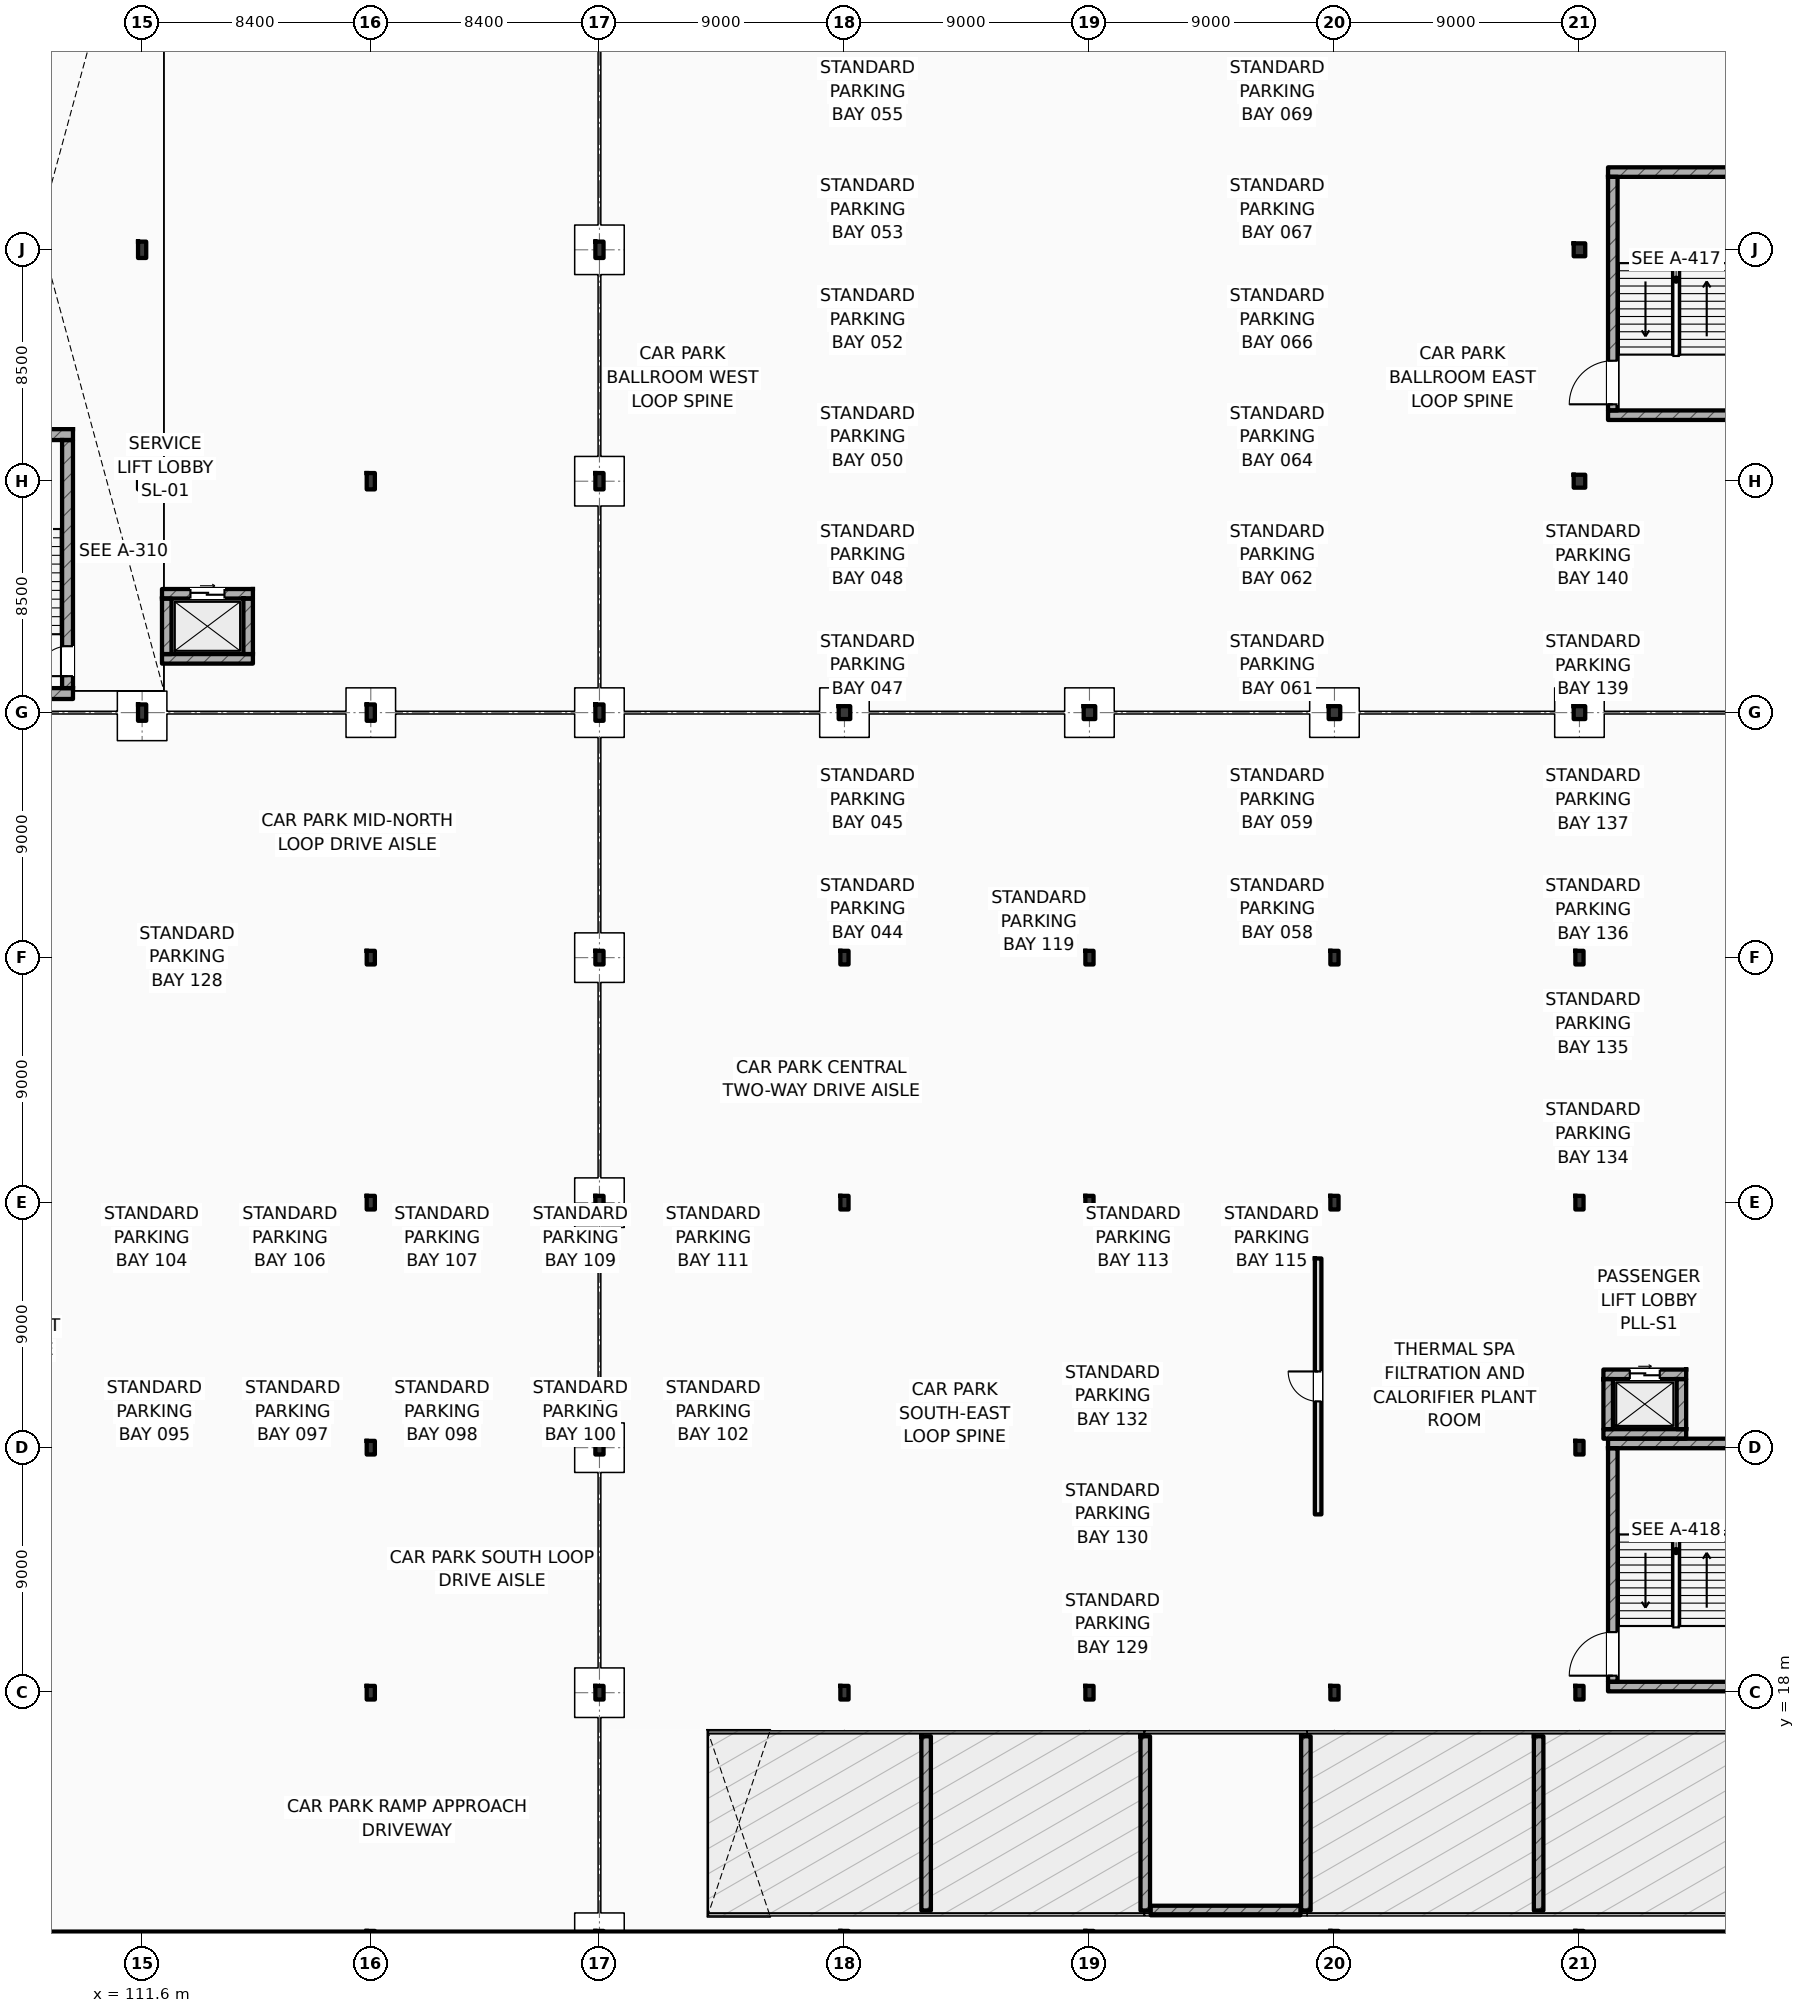
"""IFC4 building model, lengths in metres.
Left out: names, types, materials, properties, quantities, classifications, styles, units other than length and angle.
Written with IfcOpenShell. Run it as: python <this file> out.ifc"""

import sys

from ifc_helpers import new_model, si_unit, direction, frame, frame_2d, origin, origin_2d, place, context, subcontext, project, spatial, rectangle, i_section, extrude, element, fill, save


model = new_model("IFC4")
c1 = context("Model", 3, precision=1e-05, world=origin(), true_north=direction((0.0, 1.0)))
c2 = subcontext(c1, "Body", "Model", "MODEL_VIEW")
j1 = project(units=[si_unit("LENGTHUNIT", "METRE"), si_unit("PLANEANGLEUNIT", "RADIAN")], contexts=[c1])
p1 = place(None, origin())
s1 = spatial("IfcSite", under=j1, at=p1, CompositionType="ELEMENT")
p2 = place(p1, origin())
s2 = spatial("IfcBuilding", under=s1, at=p2, CompositionType="ELEMENT")
p3 = place(p2, frame((0.0, 0.0, -4.5)))
s3 = spatial("IfcBuildingStorey", under=s2, at=p3, CompositionType="ELEMENT", Elevation=-4.5)
p4 = place(p3, frame((103.2, 9.0, 0.0), z_axis=(0.0, 0.0, 1.0), x_axis=(1.0, 0.0, 0.0)))
e1 = element("IfcWall", 1, at=p4, inside=s3, PredefinedType="SOLIDWALL", context=c2, shape_type="SweptSolid", body=[
    extrude(rectangle(XDim=68.8, YDim=0.45, at=frame_2d((34.4, 0.0))), origin(), (0.0, 0.0, 1.0), 4.5),
])
for number, where, z_axis, x_axis in (
    (2, (111.6, 54.0, 0.0), (0.0, 0.0, 1.0), (1.0, 0.0, 0.0)),
    (3, (111.6, 62.5, 0.0), (0.0, 0.0, 1.0), (1.0, 0.0, 0.0)),
    (4, (111.6, 71.0, 0.0), (0.0, 0.0, 1.0), (1.0, 0.0, 0.0)),
    (5, (120.0, 54.0, 0.0), (0.0, 0.0, 1.0), (1.0, 0.0, 0.0)),
    (6, (120.0, 62.5, 0.0), (0.0, 0.0, 1.0), (1.0, 0.0, 0.0)),
    (7, (128.4, 54.0, 0.0), (0.0, 0.0, 1.0), (1.0, 0.0, 0.0)),
    (8, (128.4, 62.5, 0.0), (0.0, 0.0, 1.0), (1.0, 0.0, 0.0)),
    (9, (128.4, 71.0, 0.0), (0.0, 0.0, 1.0), (1.0, 0.0, 0.0)),
):
    element("IfcColumn", number, at=place(p3, frame(where, z_axis=z_axis, x_axis=x_axis)), inside=s3, PredefinedType="COLUMN", context=c2, shape_type="SweptSolid", body=[
        extrude(i_section(OverallWidth=0.3, OverallDepth=0.6, WebThickness=0.015, FlangeThickness=0.03, FilletRadius=0.027, at=origin_2d()), origin(), (0.0, 0.0, 1.0), 4.5),
    ])
for number, where, z_axis, x_axis in (
    (10, (164.4, 54.0, 0.0), (0.0, 0.0, 1.0), (1.0, 0.0, 0.0)),
    (11, (164.4, 62.5, 0.0), (0.0, 0.0, 1.0), (1.0, 0.0, 0.0)),
    (12, (164.4, 71.0, 0.0), (0.0, 0.0, 1.0), (1.0, 0.0, 0.0)),
    (13, (137.4, 54.0, 0.0), (0.0, 0.0, 1.0), (1.0, 0.0, 0.0)),
    (14, (146.4, 54.0, 0.0), (0.0, 0.0, 1.0), (1.0, 0.0, 0.0)),
    (15, (155.4, 54.0, 0.0), (0.0, 0.0, 1.0), (1.0, 0.0, 0.0)),
):
    element("IfcColumn", number, at=place(p3, frame(where, z_axis=z_axis, x_axis=x_axis)), inside=s3, PredefinedType="COLUMN", context=c2, shape_type="SweptSolid", body=[
        extrude(i_section(OverallWidth=0.424, OverallDepth=0.474, WebThickness=0.045, FlangeThickness=0.055, FilletRadius=0.015, at=origin_2d()), origin(), (0.0, 0.0, 1.0), 4.5),
    ])
for number, where, z_axis, x_axis in (
    (16, (120.0, 9.0, 0.0), (0.0, 0.0, 1.0), (1.0, 0.0, 0.0)),
    (17, (120.0, 18.0, 0.0), (0.0, 0.0, 1.0), (1.0, 0.0, 0.0)),
    (18, (120.0, 27.0, 0.0), (0.0, 0.0, 1.0), (1.0, 0.0, 0.0)),
    (19, (120.0, 36.0, 0.0), (0.0, 0.0, 1.0), (1.0, 0.0, 0.0)),
    (20, (120.0, 45.0, 0.0), (0.0, 0.0, 1.0), (1.0, 0.0, 0.0)),
    (21, (128.4, 9.0, 0.0), (0.0, 0.0, 1.0), (1.0, 0.0, 0.0)),
    (22, (128.4, 18.0, 0.0), (0.0, 0.0, 1.0), (1.0, 0.0, 0.0)),
    (23, (128.4, 27.0, 0.0), (0.0, 0.0, 1.0), (1.0, 0.0, 0.0)),
    (24, (128.4, 36.0, 0.0), (0.0, 0.0, 1.0), (1.0, 0.0, 0.0)),
    (25, (128.4, 45.0, 0.0), (0.0, 0.0, 1.0), (1.0, 0.0, 0.0)),
    (26, (137.4, 9.0, 0.0), (0.0, 0.0, 1.0), (1.0, 0.0, 0.0)),
    (27, (137.4, 18.0, 0.0), (0.0, 0.0, 1.0), (1.0, 0.0, 0.0)),
    (28, (137.4, 36.0, 0.0), (0.0, 0.0, 1.0), (1.0, 0.0, 0.0)),
    (29, (137.4, 45.0, 0.0), (0.0, 0.0, 1.0), (1.0, 0.0, 0.0)),
    (30, (146.4, 9.0, 0.0), (0.0, 0.0, 1.0), (1.0, 0.0, 0.0)),
    (31, (146.4, 18.0, 0.0), (0.0, 0.0, 1.0), (1.0, 0.0, 0.0)),
    (32, (146.4, 36.0, 0.0), (0.0, 0.0, 1.0), (1.0, 0.0, 0.0)),
    (33, (146.4, 45.0, 0.0), (0.0, 0.0, 1.0), (1.0, 0.0, 0.0)),
    (34, (155.4, 9.0, 0.0), (0.0, 0.0, 1.0), (1.0, 0.0, 0.0)),
    (35, (155.4, 18.0, 0.0), (0.0, 0.0, 1.0), (1.0, 0.0, 0.0)),
    (36, (155.4, 36.0, 0.0), (0.0, 0.0, 1.0), (1.0, 0.0, 0.0)),
    (37, (155.4, 45.0, 0.0), (0.0, 0.0, 1.0), (1.0, 0.0, 0.0)),
    (38, (164.4, 9.0, 0.0), (0.0, 0.0, 1.0), (1.0, 0.0, 0.0)),
    (39, (164.4, 18.0, 0.0), (0.0, 0.0, 1.0), (1.0, 0.0, 0.0)),
    (40, (164.4, 27.0, 0.0), (0.0, 0.0, 1.0), (1.0, 0.0, 0.0)),
    (41, (164.4, 36.0, 0.0), (0.0, 0.0, 1.0), (1.0, 0.0, 0.0)),
    (42, (164.4, 45.0, 0.0), (0.0, 0.0, 1.0), (1.0, 0.0, 0.0)),
):
    element("IfcColumn", number, at=place(p3, frame(where, z_axis=z_axis, x_axis=x_axis)), inside=s3, PredefinedType="COLUMN", context=c2, shape_type="SweptSolid", body=[
        extrude(i_section(OverallWidth=0.3, OverallDepth=0.5, WebThickness=0.014, FlangeThickness=0.028, FilletRadius=0.027, at=origin_2d()), origin(), (0.0, 0.0, 1.0), 4.5),
    ])
for number, where, z_axis, x_axis in (
    (43, (104.1, 64.212, 0.0), (0.0, 0.0, 1.0), (1.0, 0.0, 0.0)),
    (44, (104.1, 54.7, 0.0), (0.0, 0.0, 1.0), (1.0, 0.0, 0.0)),
):
    element("IfcWall", number, at=place(p3, frame(where, z_axis=z_axis, x_axis=x_axis)), inside=s3, PredefinedType="SHEAR", context=c2, shape_type="SweptSolid", body=[
        extrude(rectangle(XDim=4.96, YDim=0.4, at=frame_2d((2.48, 0.0))), origin(), (0.0, 0.0, 1.0), 4.5),
    ])
p5 = place(p3, frame((108.86, 54.9, 0.0), z_axis=(0.0, 0.0, 1.0), x_axis=(0.0, 1.0, 0.0)))
e45 = element("IfcWall", 45, at=p5, inside=s3, PredefinedType="SHEAR", context=c2, shape_type="SweptSolid", body=[
    extrude(rectangle(XDim=9.112, YDim=0.4, at=frame_2d((4.556, 0.0))), origin(), (0.0, 0.0, 1.0), 4.5),
])
p6 = place(p5, frame((0.44, 0.0, 0.0)))
e46 = element("IfcOpeningElement", 46, at=p6, cuts=e45, PredefinedType="OPENING", context=c2, shape_type="SweptSolid", body=[
    extrude(rectangle(XDim=1.1, YDim=2.2, at=frame_2d((0.55, 1.1))), frame((0.0, 0.21, 0.0), z_axis=(0.0, -1.0, 0.0), x_axis=(1.0, 0.0, 0.0)), (0.0, 0.0, 1.0), 0.42),
])
for number, where, z_axis, x_axis in (
    (47, (165.45, 73.855, 0.0), (0.0, 0.0, 1.0), (1.0, 0.0, 0.0)),
    (48, (165.45, 64.925, 0.0), (0.0, 0.0, 1.0), (1.0, 0.0, 0.0)),
):
    element("IfcWall", number, at=place(p3, frame(where, z_axis=z_axis, x_axis=x_axis)), inside=s3, PredefinedType="SHEAR", context=c2, shape_type="SweptSolid", body=[
        extrude(rectangle(XDim=5.0, YDim=0.35, at=frame_2d((2.5, 0.0))), origin(), (0.0, 0.0, 1.0), 4.5),
    ])
p7 = place(p3, frame((165.625, 65.1, 0.0), z_axis=(0.0, 0.0, 1.0), x_axis=(0.0, 1.0, 0.0)))
e49 = element("IfcWall", 49, at=p7, inside=s3, PredefinedType="SHEAR", context=c2, shape_type="SweptSolid", body=[
    extrude(rectangle(XDim=8.58, YDim=0.35, at=frame_2d((4.29, 0.0))), origin(), (0.0, 0.0, 1.0), 4.5),
])
p8 = place(p7, frame((0.225, 0.0, 0.0)))
e50 = element("IfcOpeningElement", 50, at=p8, cuts=e49, PredefinedType="OPENING", context=c2, shape_type="SweptSolid", body=[
    extrude(rectangle(XDim=1.6, YDim=2.2, at=frame_2d((0.8, 1.1))), frame((0.0, 0.185, 0.0), z_axis=(0.0, -1.0, 0.0), x_axis=(1.0, 0.0, 0.0)), (0.0, 0.0, 1.0), 0.37),
])
for number, where, z_axis, x_axis in (
    (51, (165.45, 27.155, 0.0), (0.0, 0.0, 1.0), (1.0, 0.0, 0.0)),
    (52, (165.45, 18.225, 0.0), (0.0, 0.0, 1.0), (1.0, 0.0, 0.0)),
):
    element("IfcWall", number, at=place(p3, frame(where, z_axis=z_axis, x_axis=x_axis)), inside=s3, PredefinedType="SHEAR", context=c2, shape_type="SweptSolid", body=[
        extrude(rectangle(XDim=5.0, YDim=0.35, at=frame_2d((2.5, 0.0))), origin(), (0.0, 0.0, 1.0), 4.5),
    ])
p9 = place(p3, frame((165.625, 18.4, 0.0), z_axis=(0.0, 0.0, 1.0), x_axis=(0.0, 1.0, 0.0)))
e53 = element("IfcWall", 53, at=p9, inside=s3, PredefinedType="SHEAR", context=c2, shape_type="SweptSolid", body=[
    extrude(rectangle(XDim=8.58, YDim=0.35, at=frame_2d((4.29, 0.0))), origin(), (0.0, 0.0, 1.0), 4.5),
])
p10 = place(p9, frame((0.225, 0.0, 0.0)))
e54 = element("IfcOpeningElement", 54, at=p10, cuts=e53, PredefinedType="OPENING", context=c2, shape_type="SweptSolid", body=[
    extrude(rectangle(XDim=1.6, YDim=2.2, at=frame_2d((0.8, 1.1))), frame((0.0, 0.185, 0.0), z_axis=(0.0, -1.0, 0.0), x_axis=(1.0, 0.0, 0.0)), (0.0, 0.0, 1.0), 0.37),
])
p11 = place(p3, frame((140.4, 10.0, 0.0), z_axis=(0.0, 0.0, 1.0), x_axis=(0.0, 1.0, 0.0)))
e55 = element("IfcWall", 55, at=p11, inside=s3, PredefinedType="SHEAR", context=c2, shape_type="SweptSolid", body=[
    extrude(rectangle(XDim=6.4, YDim=0.35, at=frame_2d((3.2, 0.0))), origin(), (0.0, 0.0, 1.0), 0.8),
])
for number, where, z_axis, x_axis in (
    (56, (148.45, 10.0, 0.0), (0.0, 0.0, 1.0), (0.0, 1.0, 0.0)),
    (57, (154.35, 10.0, 0.0), (0.0, 0.0, 1.0), (0.0, 1.0, 0.0)),
):
    element("IfcWall", number, at=place(p3, frame(where, z_axis=z_axis, x_axis=x_axis)), inside=s3, PredefinedType="SHEAR", context=c2, shape_type="SweptSolid", body=[
        extrude(rectangle(XDim=6.4, YDim=0.35, at=frame_2d((3.2, 0.0))), origin(), (0.0, 0.0, 1.0), 1.95),
    ])
p12 = place(p3, frame((148.65, 10.0, 0.0), z_axis=(0.0, 0.0, 1.0), x_axis=(1.0, 0.0, 0.0)))
e58 = element("IfcWall", 58, at=p12, inside=s3, PredefinedType="SHEAR", context=c2, shape_type="SweptSolid", body=[
    extrude(rectangle(XDim=5.5, YDim=0.35, at=frame_2d((2.75, 0.0))), origin(), (0.0, 0.0, 1.0), 1.95),
])
p13 = place(p3, frame((162.9, 10.0, 0.0), z_axis=(0.0, 0.0, 1.0), x_axis=(0.0, 1.0, 0.0)))
e59 = element("IfcWall", 59, at=p13, inside=s3, PredefinedType="SHEAR", context=c2, shape_type="SweptSolid", body=[
    extrude(rectangle(XDim=6.4, YDim=0.35, at=frame_2d((3.2, 0.0))), origin(), (0.0, 0.0, 1.0), 3.05),
])
p14 = place(p3, frame((165.28, 29.695, 0.0), z_axis=(0.0, 0.0, 1.0), x_axis=(1.0, 0.0, 0.0)))
e60 = element("IfcWall", 60, at=p14, inside=s3, PredefinedType="SHEAR", context=c2, shape_type="SweptSolid", body=[
    extrude(rectangle(XDim=3.04, YDim=0.35, at=frame_2d((1.52, 0.0))), origin(), (0.0, 0.0, 1.0), 4.1),
])
p15 = place(p14, frame((0.97, 0.0, 0.0)))
e61 = element("IfcOpeningElement", 61, at=p15, cuts=e60, PredefinedType="OPENING", context=c2, shape_type="SweptSolid", body=[
    extrude(rectangle(XDim=1.1, YDim=2.2, at=frame_2d((0.55, 1.1))), frame((0.0, 0.185, 0.0), z_axis=(0.0, -1.0, 0.0), x_axis=(1.0, 0.0, 0.0)), (0.0, 0.0, 1.0), 0.37),
])
p16 = place(p3, frame((165.28, 27.505, 0.0), z_axis=(0.0, 0.0, 1.0), x_axis=(1.0, 0.0, 0.0)))
e62 = element("IfcWall", 62, at=p16, inside=s3, PredefinedType="SHEAR", context=c2, shape_type="SweptSolid", body=[
    extrude(rectangle(XDim=3.04, YDim=0.35, at=frame_2d((1.52, 0.0))), origin(), (0.0, 0.0, 1.0), 4.1),
])
for number, where, z_axis, x_axis in (
    (63, (165.455, 27.68, 0.0), (0.0, 0.0, 1.0), (0.0, 1.0, 0.0)),
    (64, (168.145, 27.68, 0.0), (0.0, 0.0, 1.0), (0.0, 1.0, 0.0)),
):
    element("IfcWall", number, at=place(p3, frame(where, z_axis=z_axis, x_axis=x_axis)), inside=s3, PredefinedType="SHEAR", context=c2, shape_type="SweptSolid", body=[
        extrude(rectangle(XDim=1.84, YDim=0.35, at=frame_2d((0.92, 0.0))), origin(), (0.0, 0.0, 1.0), 4.1),
    ])
p17 = place(p3, frame((112.33, 58.365, 0.0), z_axis=(0.0, 0.0, 1.0), x_axis=(1.0, 0.0, 0.0)))
e65 = element("IfcWall", 65, at=p17, inside=s3, PredefinedType="SHEAR", context=c2, shape_type="SweptSolid", body=[
    extrude(rectangle(XDim=3.34, YDim=0.35, at=frame_2d((1.67, 0.0))), origin(), (0.0, 0.0, 1.0), 4.1),
])
p18 = place(p17, frame((1.045, 0.0, 0.0)))
e66 = element("IfcOpeningElement", 66, at=p18, cuts=e65, PredefinedType="OPENING", context=c2, shape_type="SweptSolid", body=[
    extrude(rectangle(XDim=1.25, YDim=2.25, at=frame_2d((0.625, 1.125))), frame((0.0, 0.185, 0.0), z_axis=(0.0, -1.0, 0.0), x_axis=(1.0, 0.0, 0.0)), (0.0, 0.0, 1.0), 0.37),
])
p19 = place(p3, frame((112.33, 55.975, 0.0), z_axis=(0.0, 0.0, 1.0), x_axis=(1.0, 0.0, 0.0)))
e67 = element("IfcWall", 67, at=p19, inside=s3, PredefinedType="SHEAR", context=c2, shape_type="SweptSolid", body=[
    extrude(rectangle(XDim=3.34, YDim=0.35, at=frame_2d((1.67, 0.0))), origin(), (0.0, 0.0, 1.0), 4.1),
])
for number, where, z_axis, x_axis in (
    (68, (112.505, 56.15, 0.0), (0.0, 0.0, 1.0), (0.0, 1.0, 0.0)),
    (69, (115.495, 56.15, 0.0), (0.0, 0.0, 1.0), (0.0, 1.0, 0.0)),
):
    element("IfcWall", number, at=place(p3, frame(where, z_axis=z_axis, x_axis=x_axis)), inside=s3, PredefinedType="SHEAR", context=c2, shape_type="SweptSolid", body=[
        extrude(rectangle(XDim=2.04, YDim=0.35, at=frame_2d((1.02, 0.0))), origin(), (0.0, 0.0, 1.0), 4.1),
    ])
p20 = place(p3, frame((154.8, 24.55, 0.0), z_axis=(0.0, 0.0, 1.0), x_axis=(0.0, 1.0, 0.0)))
e70 = element("IfcWall", 70, at=p20, inside=s3, PredefinedType="STANDARD", context=c2, shape_type="SweptSolid", body=[
    extrude(rectangle(XDim=9.4, YDim=0.24, at=frame_2d((4.7, 0.0))), origin(), (0.0, 0.0, 1.0), 4.1),
])
p21 = place(p20, frame((4.15, 0.0, 0.0)))
e71 = element("IfcOpeningElement", 71, at=p21, cuts=e70, PredefinedType="OPENING", context=c2, shape_type="SweptSolid", body=[
    extrude(rectangle(XDim=1.1, YDim=2.2, at=frame_2d((0.55, 1.1))), frame((0.0, 0.13, 0.0), z_axis=(0.0, -1.0, 0.0), x_axis=(1.0, 0.0, 0.0)), (0.0, 0.0, 1.0), 0.26),
])
p22 = place(p6, origin())
e72 = element("IfcDoor", 72, at=p22, inside=s3, OperationType="SINGLE_SWING_LEFT", PredefinedType="DOOR", context=c2, shape_type="SweptSolid", body=[
    extrude(rectangle(XDim=1.1, YDim=2.2, at=frame_2d((0.55, 1.1))), frame((0.0, 0.025, 0.0), z_axis=(0.0, -1.0, 0.0), x_axis=(1.0, 0.0, 0.0)), (0.0, 0.0, 1.0), 0.05),
])
fill(e46, e72)
p23 = place(p8, origin())
e73 = element("IfcDoor", 73, at=p23, inside=s3, OperationType="SINGLE_SWING_LEFT", PredefinedType="DOOR", context=c2, shape_type="SweptSolid", body=[
    extrude(rectangle(XDim=1.6, YDim=2.2, at=frame_2d((0.8, 1.1))), frame((0.0, 0.025, 0.0), z_axis=(0.0, -1.0, 0.0), x_axis=(1.0, 0.0, 0.0)), (0.0, 0.0, 1.0), 0.05),
])
fill(e50, e73)
p24 = place(p10, origin())
e74 = element("IfcDoor", 74, at=p24, inside=s3, OperationType="SINGLE_SWING_LEFT", PredefinedType="DOOR", context=c2, shape_type="SweptSolid", body=[
    extrude(rectangle(XDim=1.6, YDim=2.2, at=frame_2d((0.8, 1.1))), frame((0.0, 0.025, 0.0), z_axis=(0.0, -1.0, 0.0), x_axis=(1.0, 0.0, 0.0)), (0.0, 0.0, 1.0), 0.05),
])
fill(e54, e74)
p25 = place(p15, origin())
e75 = element("IfcDoor", 75, at=p25, inside=s3, OperationType="SLIDING_TO_LEFT", PredefinedType="DOOR", context=c2, shape_type="SweptSolid", body=[
    extrude(rectangle(XDim=1.1, YDim=2.2, at=frame_2d((0.55, 1.1))), frame((0.0, 0.025, 0.0), z_axis=(0.0, -1.0, 0.0), x_axis=(1.0, 0.0, 0.0)), (0.0, 0.0, 1.0), 0.05),
])
fill(e61, e75)
p26 = place(p18, origin())
e76 = element("IfcDoor", 76, at=p26, inside=s3, OperationType="SLIDING_TO_LEFT", PredefinedType="DOOR", context=c2, shape_type="SweptSolid", body=[
    extrude(rectangle(XDim=1.25, YDim=2.25, at=frame_2d((0.625, 1.125))), frame((0.0, 0.025, 0.0), z_axis=(0.0, -1.0, 0.0), x_axis=(1.0, 0.0, 0.0)), (0.0, 0.0, 1.0), 0.05),
])
fill(e66, e76)
p27 = place(p21, origin())
e77 = element("IfcDoor", 77, at=p27, inside=s3, OperationType="SINGLE_SWING_RIGHT", PredefinedType="DOOR", context=c2, shape_type="SweptSolid", body=[
    extrude(rectangle(XDim=1.1, YDim=2.2, at=frame_2d((0.55, 1.1))), frame((0.0, 0.025, 0.0), z_axis=(0.0, -1.0, 0.0), x_axis=(1.0, 0.0, 0.0)), (0.0, 0.0, 1.0), 0.05),
])
fill(e71, e77)
save(model, sys.argv[1])
